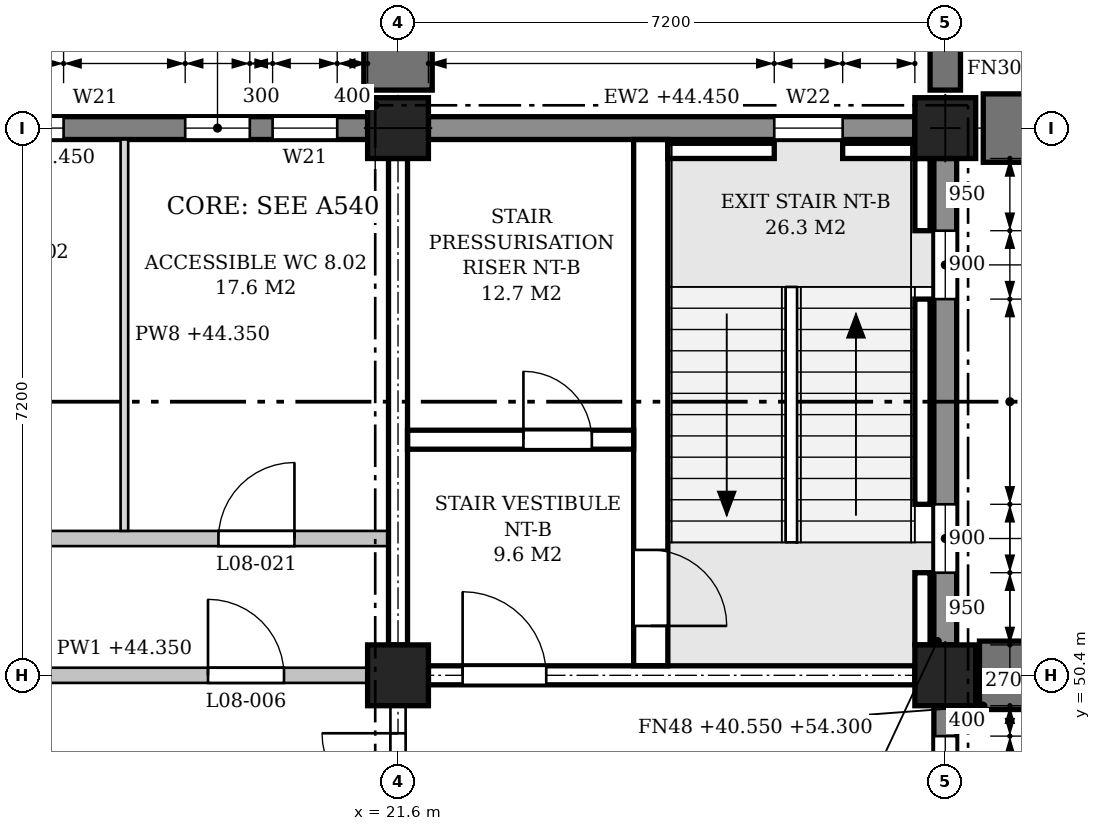
"""IFC4 building model, lengths in metres.
Left out: names, types, materials, properties, quantities, classifications, styles, units other than length and angle.
Written with IfcOpenShell. Run it as: python <this file> out.ifc"""

import sys

from ifc_helpers import new_model, si_unit, direction, frame, frame_2d, origin, origin_2d, place, context, subcontext, project, spatial, polyline, rectangle, outline, extrude, element, fill, save


model = new_model("IFC4")
c1 = context("Model", 3, precision=1e-05, world=origin(), true_north=direction((0.0, 1.0)))
c2 = subcontext(c1, "Body", "Model", "MODEL_VIEW")
j1 = project(units=[si_unit("LENGTHUNIT", "METRE"), si_unit("PLANEANGLEUNIT", "RADIAN")], contexts=[c1])
p1 = place(None, origin())
s1 = spatial("IfcSite", under=j1, at=p1, CompositionType="ELEMENT")
p2 = place(p1, origin())
s2 = spatial("IfcBuilding", under=s1, at=p2, CompositionType="ELEMENT")
p3 = place(p2, frame((0.0, 0.0, 40.8)))
s3 = spatial("IfcBuildingStorey", under=s2, at=p3, CompositionType="ELEMENT", Elevation=40.8)
for number, where, z_axis, x_axis in (
    (1, (21.6, 50.4, 0.0), (0.0, 0.0, 1.0), (1.0, 0.0, 0.0)),
    (2, (21.6, 57.6, 0.0), (0.0, 0.0, 1.0), (1.0, 0.0, 0.0)),
    (3, (28.8, 50.4, 0.0), (0.0, 0.0, 1.0), (1.0, 0.0, 0.0)),
    (4, (28.8, 57.6, 0.0), (0.0, 0.0, 1.0), (1.0, 0.0, 0.0)),
):
    element("IfcColumn", number, at=place(p3, frame(where, z_axis=z_axis, x_axis=x_axis)), inside=s3, PredefinedType="COLUMN", context=c2, shape_type="SweptSolid", body=[
        extrude(rectangle(XDim=0.8, YDim=0.8, at=origin_2d()), origin(), (0.0, 0.0, 1.0), 4.5),
    ])
p4 = place(p3, frame((28.4, 57.6, 0.0), z_axis=(0.0, 0.0, 1.0), x_axis=(-1.0, 0.0, 0.0)))
e5 = element("IfcWall", 5, at=p4, inside=s3, PredefinedType="STANDARD", context=c2, shape_type="SweptSolid", body=[
    extrude(rectangle(XDim=6.4, YDim=0.3, at=frame_2d((3.2, 0.0))), origin(), (0.0, 0.0, 1.0), 3.65),
])
p5 = place(p4, frame((0.95, 0.0, 0.9)))
e6 = element("IfcOpeningElement", 6, at=p5, cuts=e5, PredefinedType="OPENING", context=c2, shape_type="SweptSolid", body=[
    extrude(outline(polyline([(0.0, 0.0), (0.9, 0.0), (0.9, 2.25), (0.45, 2.7), (0.0, 2.25), (0.0, 0.0)])), frame((0.0, 0.16, 0.0), z_axis=(0.0, -1.0, 0.0), x_axis=(1.0, 0.0, 0.0)), (0.0, 0.0, 1.0), 0.32),
])
p6 = place(p3, frame((21.2, 57.6, 0.0), z_axis=(0.0, 0.0, 1.0), x_axis=(-1.0, 0.0, 0.0)))
e7 = element("IfcWall", 7, at=p6, inside=s3, PredefinedType="STANDARD", context=c2, shape_type="SweptSolid", body=[
    extrude(rectangle(XDim=6.4, YDim=0.3, at=frame_2d((3.2, 0.0))), origin(), (0.0, 0.0, 1.0), 3.65),
])
p7 = place(p6, frame((0.4, 0.0, 0.9)))
e8 = element("IfcOpeningElement", 8, at=p7, cuts=e7, PredefinedType="OPENING", context=c2, shape_type="SweptSolid", body=[
    extrude(outline(polyline([(0.0, 0.0), (0.85, 0.0), (0.85, 2.25), (0.425, 2.7), (0.0, 2.25), (0.0, 0.0)])), frame((0.0, 0.16, 0.0), z_axis=(0.0, -1.0, 0.0), x_axis=(1.0, 0.0, 0.0)), (0.0, 0.0, 1.0), 0.32),
])
p8 = place(p6, frame((1.55, 0.0, 0.9)))
e9 = element("IfcOpeningElement", 9, at=p8, cuts=e7, PredefinedType="OPENING", context=c2, shape_type="SweptSolid", body=[
    extrude(outline(polyline([(0.0, 0.0), (0.85, 0.0), (0.85, 2.25), (0.425, 2.7), (0.0, 2.25), (0.0, 0.0)])), frame((0.0, 0.16, 0.0), z_axis=(0.0, -1.0, 0.0), x_axis=(1.0, 0.0, 0.0)), (0.0, 0.0, 1.0), 0.32),
])
p9 = place(p6, frame((4.0, 0.0, 0.9)))
e10 = element("IfcOpeningElement", 10, at=p9, cuts=e7, PredefinedType="OPENING", context=c2, shape_type="SweptSolid", body=[
    extrude(outline(polyline([(0.0, 0.0), (0.85, 0.0), (0.85, 2.25), (0.425, 2.7), (0.0, 2.25), (0.0, 0.0)])), frame((0.0, 0.16, 0.0), z_axis=(0.0, -1.0, 0.0), x_axis=(1.0, 0.0, 0.0)), (0.0, 0.0, 1.0), 0.32),
])
p10 = place(p6, frame((5.15, 0.0, 0.9)))
e11 = element("IfcOpeningElement", 11, at=p10, cuts=e7, PredefinedType="OPENING", context=c2, shape_type="SweptSolid", body=[
    extrude(outline(polyline([(0.0, 0.0), (0.85, 0.0), (0.85, 2.25), (0.425, 2.7), (0.0, 2.25), (0.0, 0.0)])), frame((0.0, 0.16, 0.0), z_axis=(0.0, -1.0, 0.0), x_axis=(1.0, 0.0, 0.0)), (0.0, 0.0, 1.0), 0.32),
])
p11 = place(p3, frame((28.8, 43.6, 0.0), z_axis=(0.0, 0.0, 1.0), x_axis=(0.0, 1.0, 0.0)))
e12 = element("IfcWall", 12, at=p11, inside=s3, PredefinedType="STANDARD", context=c2, shape_type="SweptSolid", body=[
    extrude(rectangle(XDim=6.4, YDim=0.3, at=frame_2d((3.2, 0.0))), origin(), (0.0, 0.0, 1.0), 3.65),
])
p12 = place(p11, frame((4.0, 0.0, 0.9)))
e13 = element("IfcOpeningElement", 13, at=p12, cuts=e12, PredefinedType="OPENING", context=c2, shape_type="SweptSolid", body=[
    extrude(outline(polyline([(0.0, 0.0), (0.85, 0.0), (0.85, 2.25), (0.425, 2.7), (0.0, 2.25), (0.0, 0.0)])), frame((0.0, 0.16, 0.0), z_axis=(0.0, -1.0, 0.0), x_axis=(1.0, 0.0, 0.0)), (0.0, 0.0, 1.0), 0.32),
])
p13 = place(p11, frame((5.15, 0.0, 0.9)))
e14 = element("IfcOpeningElement", 14, at=p13, cuts=e12, PredefinedType="OPENING", context=c2, shape_type="SweptSolid", body=[
    extrude(outline(polyline([(0.0, 0.0), (0.85, 0.0), (0.85, 2.25), (0.425, 2.7), (0.0, 2.25), (0.0, 0.0)])), frame((0.0, 0.16, 0.0), z_axis=(0.0, -1.0, 0.0), x_axis=(1.0, 0.0, 0.0)), (0.0, 0.0, 1.0), 0.32),
])
p14 = place(p3, frame((28.8, 50.8, 0.0), z_axis=(0.0, 0.0, 1.0), x_axis=(0.0, 1.0, 0.0)))
e15 = element("IfcWall", 15, at=p14, inside=s3, PredefinedType="STANDARD", context=c2, shape_type="SweptSolid", body=[
    extrude(rectangle(XDim=6.4, YDim=0.3, at=frame_2d((3.2, 0.0))), origin(), (0.0, 0.0, 1.0), 3.65),
])
p15 = place(p14, frame((0.95, 0.0, 0.9)))
e16 = element("IfcOpeningElement", 16, at=p15, cuts=e15, PredefinedType="OPENING", context=c2, shape_type="SweptSolid", body=[
    extrude(outline(polyline([(0.0, 0.0), (0.9, 0.0), (0.9, 2.25), (0.45, 2.7), (0.0, 2.25), (0.0, 0.0)])), frame((0.0, 0.16, 0.0), z_axis=(0.0, -1.0, 0.0), x_axis=(1.0, 0.0, 0.0)), (0.0, 0.0, 1.0), 0.32),
])
p16 = place(p14, frame((4.55, 0.0, 0.9)))
e17 = element("IfcOpeningElement", 17, at=p16, cuts=e15, PredefinedType="OPENING", context=c2, shape_type="SweptSolid", body=[
    extrude(outline(polyline([(0.0, 0.0), (0.9, 0.0), (0.9, 2.25), (0.45, 2.7), (0.0, 2.25), (0.0, 0.0)])), frame((0.0, 0.16, 0.0), z_axis=(0.0, -1.0, 0.0), x_axis=(1.0, 0.0, 0.0)), (0.0, 0.0, 1.0), 0.32),
])
for number, where, z_axis, x_axis in (
    (18, (21.6, 58.1, -0.25), (0.0, 0.0, 1.0), (0.0, 1.0, 0.0)),
    (19, (29.25, 50.4, -0.25), (0.0, 0.0, 1.0), (1.0, 0.0, 0.0)),
):
    element("IfcWall", number, at=place(p3, frame(where, z_axis=z_axis, x_axis=x_axis)), inside=s3, PredefinedType="POLYGONAL", context=c2, shape_type="SweptSolid", body=[
        extrude(outline(polyline([(1.1, 0.0), (1.1, 12.325), (0.15, 13.75), (0.0, 13.75), (0.0, 0.0), (1.1, 0.0)])), frame((0.0, 0.45, 0.0), z_axis=(0.0, -1.0, 0.0), x_axis=(1.0, 0.0, 0.0)), (0.0, 0.0, 1.0), 0.9),
    ])
p17 = place(p3, frame((28.8, 58.1, -0.25), z_axis=(0.0, 0.0, 1.0), x_axis=(0.0, 1.0, 0.0)))
e20 = element("IfcWall", 20, at=p17, inside=s3, PredefinedType="POLYGONAL", context=c2, shape_type="SweptSolid", body=[
    extrude(outline(polyline([(0.65, 0.0), (0.65, 13.0), (0.15, 13.75), (0.0, 13.75), (0.0, 0.0), (0.65, 0.0)])), frame((0.0, 0.2, 0.0), z_axis=(0.0, -1.0, 0.0), x_axis=(1.0, 0.0, 0.0)), (0.0, 0.0, 1.0), 0.4),
])
p18 = place(p3, frame((29.3, 57.6, -0.25), z_axis=(0.0, 0.0, 1.0), x_axis=(1.0, 0.0, 0.0)))
e21 = element("IfcWall", 21, at=p18, inside=s3, PredefinedType="POLYGONAL", context=c2, shape_type="SweptSolid", body=[
    extrude(outline(polyline([(1.1, 0.0), (1.1, 12.325), (0.15, 13.75), (0.0, 13.75), (0.0, 0.0), (1.1, 0.0)])), frame((0.0, 0.45, 0.0), z_axis=(0.0, -1.0, 0.0), x_axis=(1.0, 0.0, 0.0)), (0.0, 0.0, 1.0), 0.9),
])
p19 = place(p3, frame((22.0, 50.4, 0.0), z_axis=(0.0, 0.0, 1.0), x_axis=(1.0, 0.0, 0.0)))
e22 = element("IfcWall", 22, at=p19, inside=s3, PredefinedType="SHEAR", context=c2, shape_type="SweptSolid", body=[
    extrude(rectangle(XDim=6.4, YDim=0.25, at=frame_2d((3.2, 0.0))), origin(), (0.0, 0.0, 1.0), 3.55),
])
p20 = place(p19, frame((0.45, 0.0, 0.0)))
e23 = element("IfcOpeningElement", 23, at=p20, cuts=e22, PredefinedType="OPENING", context=c2, shape_type="SweptSolid", body=[
    extrude(rectangle(XDim=1.1, YDim=2.1, at=frame_2d((0.55, 1.05))), frame((0.0, 0.135, 0.0), z_axis=(0.0, -1.0, 0.0), x_axis=(1.0, 0.0, 0.0)), (0.0, 0.0, 1.0), 0.27),
])
p21 = place(p3, frame((21.6, 50.8, 0.0), z_axis=(0.0, 0.0, 1.0), x_axis=(0.0, 1.0, 0.0)))
e24 = element("IfcWall", 24, at=p21, inside=s3, PredefinedType="SHEAR", context=c2, shape_type="SweptSolid", body=[
    extrude(rectangle(XDim=6.4, YDim=0.25, at=frame_2d((3.2, 0.0))), origin(), (0.0, 0.0, 1.0), 3.55),
])
p22 = place(p3, frame((28.5, 50.8, -0.25), z_axis=(0.0, 0.0, 1.0), x_axis=(0.0, 1.0, 0.0)))
e25 = element("IfcWall", 25, at=p22, inside=s3, PredefinedType="SHEAR", context=c2, shape_type="SweptSolid", body=[
    extrude(rectangle(XDim=0.95, YDim=0.2, at=frame_2d((0.475, 0.0))), origin(), (0.0, 0.0, 1.0), 4.5),
])
p23 = place(p3, frame((28.5, 52.65, -0.25), z_axis=(0.0, 0.0, 1.0), x_axis=(0.0, 1.0, 0.0)))
e26 = element("IfcWall", 26, at=p23, inside=s3, PredefinedType="SHEAR", context=c2, shape_type="SweptSolid", body=[
    extrude(rectangle(XDim=2.7, YDim=0.2, at=frame_2d((1.35, 0.0))), origin(), (0.0, 0.0, 1.0), 4.5),
])
p24 = place(p3, frame((28.5, 56.25, -0.25), z_axis=(0.0, 0.0, 1.0), x_axis=(0.0, 1.0, 0.0)))
e27 = element("IfcWall", 27, at=p24, inside=s3, PredefinedType="SHEAR", context=c2, shape_type="SweptSolid", body=[
    extrude(rectangle(XDim=0.95, YDim=0.2, at=frame_2d((0.475, 0.0))), origin(), (0.0, 0.0, 1.0), 4.5),
])
p25 = place(p3, frame((25.15, 57.3, -0.25), z_axis=(0.0, 0.0, 1.0), x_axis=(1.0, 0.0, 0.0)))
e28 = element("IfcWall", 28, at=p25, inside=s3, PredefinedType="SHEAR", context=c2, shape_type="SweptSolid", body=[
    extrude(rectangle(XDim=1.4, YDim=0.2, at=frame_2d((0.7, 0.0))), origin(), (0.0, 0.0, 1.0), 4.5),
])
p26 = place(p3, frame((27.45, 57.3, -0.25), z_axis=(0.0, 0.0, 1.0), x_axis=(1.0, 0.0, 0.0)))
e29 = element("IfcWall", 29, at=p26, inside=s3, PredefinedType="SHEAR", context=c2, shape_type="SweptSolid", body=[
    extrude(rectangle(XDim=0.95, YDim=0.2, at=frame_2d((0.475, 0.0))), origin(), (0.0, 0.0, 1.0), 4.5),
])
p27 = place(p3, frame((24.925, 50.525, 0.0), z_axis=(0.0, 0.0, 1.0), x_axis=(0.0, 1.0, 0.0)))
e30 = element("IfcWall", 30, at=p27, inside=s3, PredefinedType="SHEAR", context=c2, shape_type="SweptSolid", body=[
    extrude(rectangle(XDim=6.925, YDim=0.45, at=frame_2d((3.462, 0.0))), origin(), (0.0, 0.0, 1.0), 4.25),
])
p28 = place(p27, frame((0.525, 0.0, 0.0)))
e31 = element("IfcOpeningElement", 31, at=p28, cuts=e30, PredefinedType="OPENING", context=c2, shape_type="SweptSolid", body=[
    extrude(rectangle(XDim=1.0, YDim=2.1, at=frame_2d((0.5, 1.05))), frame((0.0, 0.235, 0.0), z_axis=(0.0, -1.0, 0.0), x_axis=(1.0, 0.0, 0.0)), (0.0, 0.0, 1.0), 0.47),
])
p29 = place(p3, frame((21.725, 53.5, 0.0), z_axis=(0.0, 0.0, 1.0), x_axis=(1.0, 0.0, 0.0)))
e32 = element("IfcWall", 32, at=p29, inside=s3, PredefinedType="SHEAR", context=c2, shape_type="SweptSolid", body=[
    extrude(rectangle(XDim=2.975, YDim=0.25, at=frame_2d((1.487, 0.0))), origin(), (0.0, 0.0, 1.0), 4.25),
])
p30 = place(p29, frame((1.525, 0.0, 0.0)))
e33 = element("IfcOpeningElement", 33, at=p30, cuts=e32, PredefinedType="OPENING", context=c2, shape_type="SweptSolid", body=[
    extrude(rectangle(XDim=0.9, YDim=2.1, at=frame_2d((0.45, 1.05))), frame((0.0, 0.135, 0.0), z_axis=(0.0, -1.0, 0.0), x_axis=(1.0, 0.0, 0.0)), (0.0, 0.0, 1.0), 0.27),
])
p31 = place(p3, frame((14.8, 50.4, 0.0), z_axis=(0.0, 0.0, 1.0), x_axis=(1.0, 0.0, 0.0)))
e34 = element("IfcWall", 34, at=p31, inside=s3, PredefinedType="PARTITIONING", context=c2, shape_type="SweptSolid", body=[
    extrude(rectangle(XDim=6.4, YDim=0.2, at=frame_2d((3.2, 0.0))), origin(), (0.0, 0.0, 1.0), 3.55),
])
p32 = place(p31, frame((4.3, 0.0, 0.0)))
e35 = element("IfcOpeningElement", 35, at=p32, cuts=e34, PredefinedType="OPENING", context=c2, shape_type="SweptSolid", body=[
    extrude(rectangle(XDim=1.0, YDim=2.1, at=frame_2d((0.5, 1.05))), frame((0.0, 0.11, 0.0), z_axis=(0.0, -1.0, 0.0), x_axis=(1.0, 0.0, 0.0)), (0.0, 0.0, 1.0), 0.22),
])
p33 = place(p3, frame((7.325, 52.2, 0.0), z_axis=(0.0, 0.0, 1.0), x_axis=(1.0, 0.0, 0.0)))
e36 = element("IfcWall", 36, at=p33, inside=s3, PredefinedType="PARTITIONING", context=c2, shape_type="SweptSolid", body=[
    extrude(outline(polyline([(0.0, 0.0), (14.15, 0.0), (14.15, 3.55), (14.05, 3.55), (14.05, 4.25), (7.3, 4.25), (7.3, 3.55), (6.85, 3.55), (6.85, 4.25), (0.1, 4.25), (0.1, 3.55), (0.0, 3.55), (0.0, 0.0)])), frame((0.0, 0.1, 0.0), z_axis=(0.0, -1.0, 0.0), x_axis=(1.0, 0.0, 0.0)), (0.0, 0.0, 1.0), 0.2),
])
p34 = place(p33, frame((1.238, 0.0, 0.0)))
e37 = element("IfcOpeningElement", 37, at=p34, cuts=e36, PredefinedType="OPENING", context=c2, shape_type="SweptSolid", body=[
    extrude(rectangle(XDim=1.0, YDim=2.1, at=frame_2d((0.5, 1.05))), frame((0.0, 0.11, 0.0), z_axis=(0.0, -1.0, 0.0), x_axis=(1.0, 0.0, 0.0)), (0.0, 0.0, 1.0), 0.22),
])
p35 = place(p33, frame((4.775, 0.0, 0.0)))
e38 = element("IfcOpeningElement", 38, at=p35, cuts=e36, PredefinedType="OPENING", context=c2, shape_type="SweptSolid", body=[
    extrude(rectangle(XDim=1.0, YDim=2.1, at=frame_2d((0.5, 1.05))), frame((0.0, 0.11, 0.0), z_axis=(0.0, -1.0, 0.0), x_axis=(1.0, 0.0, 0.0)), (0.0, 0.0, 1.0), 0.22),
])
p36 = place(p33, frame((8.375, 0.0, 0.0)))
e39 = element("IfcOpeningElement", 39, at=p36, cuts=e36, PredefinedType="OPENING", context=c2, shape_type="SweptSolid", body=[
    extrude(rectangle(XDim=1.0, YDim=2.1, at=frame_2d((0.5, 1.05))), frame((0.0, 0.11, 0.0), z_axis=(0.0, -1.0, 0.0), x_axis=(1.0, 0.0, 0.0)), (0.0, 0.0, 1.0), 0.22),
])
p37 = place(p33, frame((11.913, 0.0, 0.0)))
e40 = element("IfcOpeningElement", 40, at=p37, cuts=e36, PredefinedType="OPENING", context=c2, shape_type="SweptSolid", body=[
    extrude(rectangle(XDim=1.0, YDim=2.1, at=frame_2d((0.5, 1.05))), frame((0.0, 0.11, 0.0), z_axis=(0.0, -1.0, 0.0), x_axis=(1.0, 0.0, 0.0)), (0.0, 0.0, 1.0), 0.22),
])
p38 = place(p3, frame((18.0, 52.3, 0.0), z_axis=(0.0, 0.0, 1.0), x_axis=(0.0, 1.0, 0.0)))
e41 = element("IfcWall", 41, at=p38, inside=s3, PredefinedType="PARTITIONING", context=c2, shape_type="SweptSolid", body=[
    extrude(rectangle(XDim=5.15, YDim=0.1, at=frame_2d((2.575, 0.0))), origin(), (0.0, 0.0, 1.0), 3.55),
])
p39 = place(p3, frame((21.6, 47.275, 0.0), z_axis=(0.0, 0.0, 1.0), x_axis=(0.0, 1.0, 0.0)))
e42 = element("IfcWall", 42, at=p39, inside=s3, PredefinedType="PARTITIONING", context=c2, shape_type="SweptSolid", body=[
    extrude(rectangle(XDim=2.725, YDim=0.2, at=frame_2d((1.363, 0.0))), origin(), (0.0, 0.0, 1.0), 3.55),
])
p40 = place(p39, frame((0.363, 0.0, 0.0)))
e43 = element("IfcOpeningElement", 43, at=p40, cuts=e42, PredefinedType="OPENING", context=c2, shape_type="SweptSolid", body=[
    extrude(rectangle(XDim=2.0, YDim=2.4, at=frame_2d((1.0, 1.2))), frame((0.0, 0.11, 0.0), z_axis=(0.0, -1.0, 0.0), x_axis=(1.0, 0.0, 0.0)), (0.0, 0.0, 1.0), 0.22),
])
p41 = place(p13, origin())
e44 = element("IfcWindow", 44, at=p41, inside=s3, PartitioningType="SINGLE_PANEL", PredefinedType="WINDOW", context=c2, shape_type="SweptSolid", body=[
    extrude(outline(polyline([(0.0, 0.0), (0.85, 0.0), (0.85, 2.25), (0.425, 2.7), (0.0, 2.25), (0.0, 0.0)])), frame((0.0, 0.03, 0.0), z_axis=(0.0, -1.0, 0.0), x_axis=(1.0, 0.0, 0.0)), (0.0, 0.0, 1.0), 0.06),
])
fill(e14, e44)
p42 = place(p15, origin())
e45 = element("IfcWindow", 45, at=p42, inside=s3, PartitioningType="SINGLE_PANEL", PredefinedType="WINDOW", context=c2, shape_type="SweptSolid", body=[
    extrude(outline(polyline([(0.0, 0.0), (0.9, 0.0), (0.9, 2.25), (0.45, 2.7), (0.0, 2.25), (0.0, 0.0)])), frame((0.0, 0.03, 0.0), z_axis=(0.0, -1.0, 0.0), x_axis=(1.0, 0.0, 0.0)), (0.0, 0.0, 1.0), 0.06),
])
fill(e16, e45)
p43 = place(p16, origin())
e46 = element("IfcWindow", 46, at=p43, inside=s3, PartitioningType="SINGLE_PANEL", PredefinedType="WINDOW", context=c2, shape_type="SweptSolid", body=[
    extrude(outline(polyline([(0.0, 0.0), (0.9, 0.0), (0.9, 2.25), (0.45, 2.7), (0.0, 2.25), (0.0, 0.0)])), frame((0.0, 0.03, 0.0), z_axis=(0.0, -1.0, 0.0), x_axis=(1.0, 0.0, 0.0)), (0.0, 0.0, 1.0), 0.06),
])
fill(e17, e46)
p44 = place(p5, origin())
e47 = element("IfcWindow", 47, at=p44, inside=s3, PartitioningType="SINGLE_PANEL", PredefinedType="WINDOW", context=c2, shape_type="SweptSolid", body=[
    extrude(outline(polyline([(0.0, 0.0), (0.9, 0.0), (0.9, 2.25), (0.45, 2.7), (0.0, 2.25), (0.0, 0.0)])), frame((0.0, 0.03, 0.0), z_axis=(0.0, -1.0, 0.0), x_axis=(1.0, 0.0, 0.0)), (0.0, 0.0, 1.0), 0.06),
])
fill(e6, e47)
p45 = place(p7, origin())
e48 = element("IfcWindow", 48, at=p45, inside=s3, PartitioningType="SINGLE_PANEL", PredefinedType="WINDOW", context=c2, shape_type="SweptSolid", body=[
    extrude(outline(polyline([(0.0, 0.0), (0.85, 0.0), (0.85, 2.25), (0.425, 2.7), (0.0, 2.25), (0.0, 0.0)])), frame((0.0, 0.03, 0.0), z_axis=(0.0, -1.0, 0.0), x_axis=(1.0, 0.0, 0.0)), (0.0, 0.0, 1.0), 0.06),
])
fill(e8, e48)
p46 = place(p8, origin())
e49 = element("IfcWindow", 49, at=p46, inside=s3, PartitioningType="SINGLE_PANEL", PredefinedType="WINDOW", context=c2, shape_type="SweptSolid", body=[
    extrude(outline(polyline([(0.0, 0.0), (0.85, 0.0), (0.85, 2.25), (0.425, 2.7), (0.0, 2.25), (0.0, 0.0)])), frame((0.0, 0.03, 0.0), z_axis=(0.0, -1.0, 0.0), x_axis=(1.0, 0.0, 0.0)), (0.0, 0.0, 1.0), 0.06),
])
fill(e9, e49)
p47 = place(p9, origin())
e50 = element("IfcWindow", 50, at=p47, inside=s3, PartitioningType="SINGLE_PANEL", PredefinedType="WINDOW", context=c2, shape_type="SweptSolid", body=[
    extrude(outline(polyline([(0.0, 0.0), (0.85, 0.0), (0.85, 2.25), (0.425, 2.7), (0.0, 2.25), (0.0, 0.0)])), frame((0.0, 0.03, 0.0), z_axis=(0.0, -1.0, 0.0), x_axis=(1.0, 0.0, 0.0)), (0.0, 0.0, 1.0), 0.06),
])
fill(e10, e50)
p48 = place(p28, frame((1.0, 0.0, 0.0), z_axis=(0.0, 0.0, 1.0), x_axis=(-1.0, 0.0, 0.0)))
e51 = element("IfcDoor", 51, at=p48, inside=s3, OperationType="SINGLE_SWING_RIGHT", PredefinedType="DOOR", context=c2, shape_type="SweptSolid", body=[
    extrude(rectangle(XDim=1.0, YDim=2.1, at=frame_2d((0.5, 1.05))), frame((0.0, 0.025, 0.0), z_axis=(0.0, -1.0, 0.0), x_axis=(1.0, 0.0, 0.0)), (0.0, 0.0, 1.0), 0.05),
])
fill(e31, e51)
p49 = place(p20, origin())
e52 = element("IfcDoor", 52, at=p49, inside=s3, OperationType="SINGLE_SWING_LEFT", PredefinedType="DOOR", context=c2, shape_type="SweptSolid", body=[
    extrude(rectangle(XDim=1.1, YDim=2.1, at=frame_2d((0.55, 1.05))), frame((0.0, 0.025, 0.0), z_axis=(0.0, -1.0, 0.0), x_axis=(1.0, 0.0, 0.0)), (0.0, 0.0, 1.0), 0.05),
])
fill(e23, e52)
p50 = place(p30, origin())
e53 = element("IfcDoor", 53, at=p50, inside=s3, OperationType="SINGLE_SWING_LEFT", PredefinedType="DOOR", context=c2, shape_type="SweptSolid", body=[
    extrude(rectangle(XDim=0.9, YDim=2.1, at=frame_2d((0.45, 1.05))), frame((0.0, 0.025, 0.0), z_axis=(0.0, -1.0, 0.0), x_axis=(1.0, 0.0, 0.0)), (0.0, 0.0, 1.0), 0.05),
])
fill(e33, e53)
p51 = place(p40, origin())
e54 = element("IfcDoor", 54, at=p51, inside=s3, OperationType="DOUBLE_DOOR_SINGLE_SWING", PredefinedType="DOOR", context=c2, shape_type="SweptSolid", body=[
    extrude(rectangle(XDim=2.0, YDim=2.4, at=frame_2d((1.0, 1.2))), frame((0.0, 0.025, 0.0), z_axis=(0.0, -1.0, 0.0), x_axis=(1.0, 0.0, 0.0)), (0.0, 0.0, 1.0), 0.05),
])
fill(e43, e54)
p52 = place(p32, origin())
e55 = element("IfcDoor", 55, at=p52, inside=s3, OperationType="SINGLE_SWING_LEFT", PredefinedType="DOOR", context=c2, shape_type="SweptSolid", body=[
    extrude(rectangle(XDim=1.0, YDim=2.1, at=frame_2d((0.5, 1.05))), frame((0.0, 0.025, 0.0), z_axis=(0.0, -1.0, 0.0), x_axis=(1.0, 0.0, 0.0)), (0.0, 0.0, 1.0), 0.05),
])
fill(e35, e55)
p53 = place(p37, origin())
e56 = element("IfcDoor", 56, at=p53, inside=s3, OperationType="SINGLE_SWING_RIGHT", PredefinedType="DOOR", context=c2, shape_type="SweptSolid", body=[
    extrude(rectangle(XDim=1.0, YDim=2.1, at=frame_2d((0.5, 1.05))), frame((0.0, 0.025, 0.0), z_axis=(0.0, -1.0, 0.0), x_axis=(1.0, 0.0, 0.0)), (0.0, 0.0, 1.0), 0.05),
])
fill(e40, e56)
save(model, sys.argv[1])
